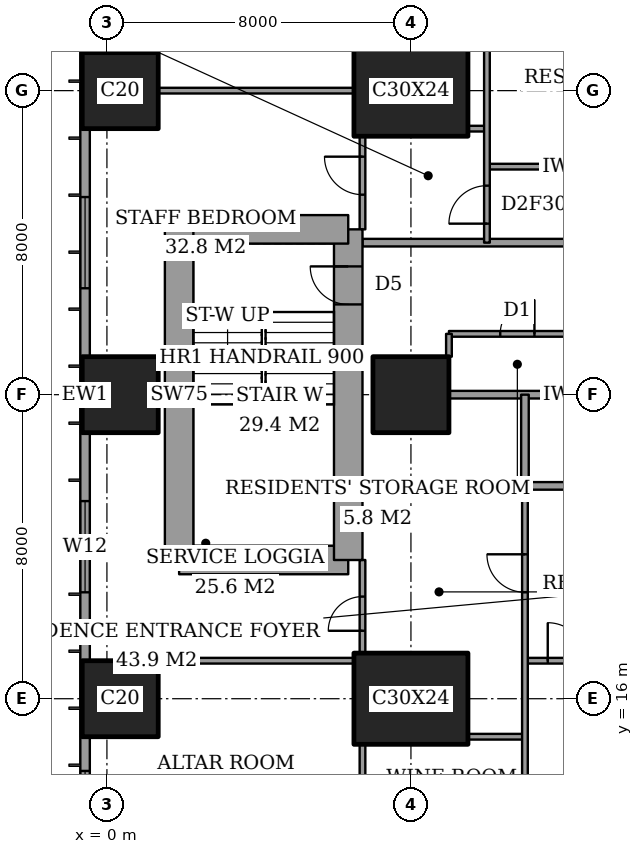
"""IFC4 building model, lengths in metres.
Left out: names, types, materials, properties, quantities, classifications, styles, units other than length and angle.
Written with IfcOpenShell. Run it as: python <this file> out.ifc"""

import sys

from ifc_helpers import new_model, si_unit, direction, frame, frame_2d, origin, origin_2d, place, context, subcontext, project, spatial, rectangle, extrude, element, fill, save


model = new_model("IFC4")
c1 = context("Model", 3, precision=1e-05, world=origin(), true_north=direction((0.0, 1.0)))
c2 = subcontext(c1, "Body", "Model", "MODEL_VIEW")
j1 = project(units=[si_unit("LENGTHUNIT", "METRE"), si_unit("PLANEANGLEUNIT", "RADIAN")], contexts=[c1])
p1 = place(None, origin())
s1 = spatial("IfcSite", under=j1, at=p1, CompositionType="ELEMENT")
p2 = place(p1, origin())
s2 = spatial("IfcBuilding", under=s1, at=p2, CompositionType="ELEMENT")
p3 = place(p2, frame((0.0, 0.0, 96.2)))
s3 = spatial("IfcBuildingStorey", under=s2, at=p3, CompositionType="ELEMENT", Elevation=96.2)
for number, where, z_axis, x_axis in (
    (1, (0.35, 16.0, 0.0), (0.0, 0.0, 1.0), (1.0, 0.0, 0.0)),
    (2, (0.35, 24.0, 0.0), (0.0, 0.0, 1.0), (1.0, 0.0, 0.0)),
    (3, (0.35, 32.0, 0.0), (0.0, 0.0, 1.0), (1.0, 0.0, 0.0)),
):
    element("IfcColumn", number, at=place(p3, frame(where, z_axis=z_axis, x_axis=x_axis)), inside=s3, PredefinedType="COLUMN", context=c2, shape_type="SweptSolid", body=[
        extrude(rectangle(XDim=2.0, YDim=2.0, at=origin_2d()), origin(), (0.0, 0.0, 1.0), 3.6),
    ])
p4 = place(p3, frame((8.0, 16.0, 0.0), z_axis=(0.0, 0.0, 1.0), x_axis=(1.0, 0.0, 0.0)))
e4 = element("IfcColumn", 4, at=p4, inside=s3, PredefinedType="COLUMN", context=c2, shape_type="SweptSolid", body=[
    extrude(rectangle(XDim=3.0, YDim=2.4, at=origin_2d()), origin(), (0.0, 0.0, 1.0), 3.6),
])
p5 = place(p3, frame((8.0, 24.0, 0.0), z_axis=(0.0, 0.0, 1.0), x_axis=(1.0, 0.0, 0.0)))
e5 = element("IfcColumn", 5, at=p5, inside=s3, PredefinedType="COLUMN", context=c2, shape_type="SweptSolid", body=[
    extrude(rectangle(XDim=2.0, YDim=2.0, at=origin_2d()), origin(), (0.0, 0.0, 1.0), 3.6),
])
p6 = place(p3, frame((8.0, 32.0, 0.0), z_axis=(0.0, 0.0, 1.0), x_axis=(1.0, 0.0, 0.0)))
e6 = element("IfcColumn", 6, at=p6, inside=s3, PredefinedType="COLUMN", context=c2, shape_type="SweptSolid", body=[
    extrude(rectangle(XDim=3.0, YDim=2.4, at=origin_2d()), origin(), (0.0, 0.0, 1.0), 3.6),
])
p7 = place(p3, frame((1.9, 19.65, 0.0), z_axis=(0.0, 0.0, 1.0), x_axis=(1.0, 0.0, 0.0)))
e7 = element("IfcWall", 7, at=p7, inside=s3, PredefinedType="SHEAR", context=c2, shape_type="SweptSolid", body=[
    extrude(rectangle(XDim=4.45, YDim=0.75, at=frame_2d((2.225, 0.0))), origin(), (0.0, 0.0, 1.0), 3.6),
])
p8 = place(p3, frame((6.35, 19.65, 0.0), z_axis=(0.0, 0.0, 1.0), x_axis=(0.0, 1.0, 0.0)))
e8 = element("IfcWall", 8, at=p8, inside=s3, PredefinedType="SHEAR", context=c2, shape_type="SweptSolid", body=[
    extrude(rectangle(XDim=8.7, YDim=0.75, at=frame_2d((4.35, 0.0))), origin(), (0.0, 0.0, 1.0), 3.6),
])
p9 = place(p8, frame((6.725, 0.0, 0.0)))
e9 = element("IfcOpeningElement", 9, at=p9, cuts=e8, PredefinedType="OPENING", context=c2, shape_type="SweptSolid", body=[
    extrude(rectangle(XDim=1.0, YDim=2.1, at=frame_2d((0.5, 1.05))), frame((0.0, 0.385, 0.0), z_axis=(0.0, -1.0, 0.0), x_axis=(1.0, 0.0, 0.0)), (0.0, 0.0, 1.0), 0.77),
])
p10 = place(p3, frame((6.35, 28.35, 0.0), z_axis=(0.0, 0.0, 1.0), x_axis=(-1.0, 0.0, 0.0)))
e10 = element("IfcWall", 10, at=p10, inside=s3, PredefinedType="SHEAR", context=c2, shape_type="SweptSolid", body=[
    extrude(rectangle(XDim=4.45, YDim=0.75, at=frame_2d((2.225, 0.0))), origin(), (0.0, 0.0, 1.0), 3.6),
])
p11 = place(p3, frame((1.9, 28.35, 0.0), z_axis=(0.0, 0.0, 1.0), x_axis=(0.0, -1.0, 0.0)))
e11 = element("IfcWall", 11, at=p11, inside=s3, PredefinedType="SHEAR", context=c2, shape_type="SweptSolid", body=[
    extrude(rectangle(XDim=8.7, YDim=0.75, at=frame_2d((4.35, 0.0))), origin(), (0.0, 0.0, 1.0), 3.6),
])
p12 = place(p3, frame((-0.575, 44.825, 0.0), z_axis=(0.0, 0.0, 1.0), x_axis=(0.0, -1.0, 0.0)))
e12 = element("IfcWall", 12, at=p12, inside=s3, PredefinedType="SOLIDWALL", context=c2, shape_type="SweptSolid", body=[
    extrude(rectangle(XDim=41.65, YDim=0.25, at=frame_2d((20.825, 0.0))), origin(), (0.0, 0.0, 1.0), 3.6),
])
p13 = place(p12, frame((0.775, 0.0, 0.4)))
e13 = element("IfcOpeningElement", 13, at=p13, cuts=e12, PredefinedType="OPENING", context=c2, shape_type="SweptSolid", body=[
    extrude(rectangle(XDim=2.4, YDim=2.2, at=frame_2d((1.2, 1.1))), frame((0.0, 0.135, 0.0), z_axis=(0.0, -1.0, 0.0), x_axis=(1.0, 0.0, 0.0)), (0.0, 0.0, 1.0), 0.27),
])
p14 = place(p12, frame((6.1, 0.0, 0.4)))
e14 = element("IfcOpeningElement", 14, at=p14, cuts=e12, PredefinedType="OPENING", context=c2, shape_type="SweptSolid", body=[
    extrude(rectangle(XDim=1.2, YDim=2.2, at=frame_2d((0.6, 1.1))), frame((0.0, 0.135, 0.0), z_axis=(0.0, -1.0, 0.0), x_axis=(1.0, 0.0, 0.0)), (0.0, 0.0, 1.0), 0.27),
])
p15 = place(p12, frame((8.425, 0.0, 0.4)))
e15 = element("IfcOpeningElement", 15, at=p15, cuts=e12, PredefinedType="OPENING", context=c2, shape_type="SweptSolid", body=[
    extrude(rectangle(XDim=2.4, YDim=2.2, at=frame_2d((1.2, 1.1))), frame((0.0, 0.135, 0.0), z_axis=(0.0, -1.0, 0.0), x_axis=(1.0, 0.0, 0.0)), (0.0, 0.0, 1.0), 0.27),
])
p16 = place(p12, frame((15.625, 0.0, 0.4)))
e16 = element("IfcOpeningElement", 16, at=p16, cuts=e12, PredefinedType="OPENING", context=c2, shape_type="SweptSolid", body=[
    extrude(rectangle(XDim=2.4, YDim=2.2, at=frame_2d((1.2, 1.1))), frame((0.0, 0.135, 0.0), z_axis=(0.0, -1.0, 0.0), x_axis=(1.0, 0.0, 0.0)), (0.0, 0.0, 1.0), 0.27),
])
p17 = place(p12, frame((23.625, 0.0, 0.4)))
e17 = element("IfcOpeningElement", 17, at=p17, cuts=e12, PredefinedType="OPENING", context=c2, shape_type="SweptSolid", body=[
    extrude(rectangle(XDim=2.4, YDim=2.2, at=frame_2d((1.2, 1.1))), frame((0.0, 0.135, 0.0), z_axis=(0.0, -1.0, 0.0), x_axis=(1.0, 0.0, 0.0)), (0.0, 0.0, 1.0), 0.27),
])
p18 = place(p12, frame((30.725, 0.0, 0.4)))
e18 = element("IfcOpeningElement", 18, at=p18, cuts=e12, PredefinedType="OPENING", context=c2, shape_type="SweptSolid", body=[
    extrude(rectangle(XDim=2.4, YDim=2.2, at=frame_2d((1.2, 1.1))), frame((0.0, 0.135, 0.0), z_axis=(0.0, -1.0, 0.0), x_axis=(1.0, 0.0, 0.0)), (0.0, 0.0, 1.0), 0.27),
])
p19 = place(p12, frame((34.325, 0.0, 0.4)))
e19 = element("IfcOpeningElement", 19, at=p19, cuts=e12, PredefinedType="OPENING", context=c2, shape_type="SweptSolid", body=[
    extrude(rectangle(XDim=1.2, YDim=2.2, at=frame_2d((0.6, 1.1))), frame((0.0, 0.135, 0.0), z_axis=(0.0, -1.0, 0.0), x_axis=(1.0, 0.0, 0.0)), (0.0, 0.0, 1.0), 0.27),
])
p20 = place(p12, frame((38.475, 0.0, 0.4)))
e20 = element("IfcOpeningElement", 20, at=p20, cuts=e12, PredefinedType="OPENING", context=c2, shape_type="SweptSolid", body=[
    extrude(rectangle(XDim=2.4, YDim=2.2, at=frame_2d((1.2, 1.1))), frame((0.0, 0.135, 0.0), z_axis=(0.0, -1.0, 0.0), x_axis=(1.0, 0.0, 0.0)), (0.0, 0.0, 1.0), 0.27),
])
p21 = place(p3, frame((9.5, 15.0, 0.0), z_axis=(0.0, 0.0, 1.0), x_axis=(1.0, 0.0, 0.0)))
e21 = element("IfcWall", 21, at=p21, inside=s3, PredefinedType="PARTITIONING", context=c2, shape_type="SweptSolid", body=[
    extrude(rectangle(XDim=1.5, YDim=0.15, at=frame_2d((0.75, 0.0))), origin(), (0.0, 0.0, 1.0), 3.35),
])
p22 = place(p3, frame((1.35, 17.0, 0.0), z_axis=(0.0, 0.0, 1.0), x_axis=(1.0, 0.0, 0.0)))
e22 = element("IfcWall", 22, at=p22, inside=s3, PredefinedType="PARTITIONING", context=c2, shape_type="SweptSolid", body=[
    extrude(rectangle(XDim=5.15, YDim=0.15, at=frame_2d((2.575, 0.0))), origin(), (0.0, 0.0, 1.0), 3.35),
])
p23 = place(p3, frame((11.0, 17.0, 0.0), z_axis=(0.0, 0.0, 1.0), x_axis=(1.0, 0.0, 0.0)))
e23 = element("IfcWall", 23, at=p23, inside=s3, PredefinedType="PARTITIONING", context=c2, shape_type="SweptSolid", body=[
    extrude(rectangle(XDim=3.4, YDim=0.15, at=frame_2d((1.7, 0.0))), origin(), (0.0, 0.0, 1.0), 3.35),
])
p24 = place(p23, frame((0.6, 0.0, 0.0)))
e24 = element("IfcOpeningElement", 24, at=p24, cuts=e23, PredefinedType="OPENING", context=c2, shape_type="SweptSolid", body=[
    extrude(rectangle(XDim=1.0, YDim=2.1, at=frame_2d((0.5, 1.05))), frame((0.0, 0.085, 0.0), z_axis=(0.0, -1.0, 0.0), x_axis=(1.0, 0.0, 0.0)), (0.0, 0.0, 1.0), 0.17),
])
p25 = place(p3, frame((11.0, 21.6, 0.0), z_axis=(0.0, 0.0, 1.0), x_axis=(1.0, 0.0, 0.0)))
e25 = element("IfcWall", 25, at=p25, inside=s3, PredefinedType="PARTITIONING", context=c2, shape_type="SweptSolid", body=[
    extrude(rectangle(XDim=3.8, YDim=0.2, at=frame_2d((1.9, 0.0))), origin(), (0.0, 0.0, 1.0), 3.35),
])
p26 = place(p25, frame((1.45, 0.0, 0.0)))
e26 = element("IfcOpeningElement", 26, at=p26, cuts=e25, PredefinedType="OPENING", context=c2, shape_type="SweptSolid", body=[
    extrude(rectangle(XDim=0.9, YDim=2.1, at=frame_2d((0.45, 1.05))), frame((0.0, 0.11, 0.0), z_axis=(0.0, -1.0, 0.0), x_axis=(1.0, 0.0, 0.0)), (0.0, 0.0, 1.0), 0.22),
])
p27 = place(p3, frame((9.0, 24.0, 0.0), z_axis=(0.0, 0.0, 1.0), x_axis=(1.0, 0.0, 0.0)))
e27 = element("IfcWall", 27, at=p27, inside=s3, PredefinedType="PARTITIONING", context=c2, shape_type="SweptSolid", body=[
    extrude(rectangle(XDim=6.0, YDim=0.2, at=frame_2d((3.0, 0.0))), origin(), (0.0, 0.0, 1.0), 3.35),
])
p28 = place(p3, frame((9.0, 25.6, 0.0), z_axis=(0.0, 0.0, 1.0), x_axis=(1.0, 0.0, 0.0)))
e28 = element("IfcWall", 28, at=p28, inside=s3, PredefinedType="PARTITIONING", context=c2, shape_type="SweptSolid", body=[
    extrude(rectangle(XDim=3.6, YDim=0.15, at=frame_2d((1.8, 0.0))), origin(), (0.0, 0.0, 1.0), 3.35),
])
p29 = place(p28, frame((1.35, 0.0, 0.0)))
e29 = element("IfcOpeningElement", 29, at=p29, cuts=e28, PredefinedType="OPENING", context=c2, shape_type="SweptSolid", body=[
    extrude(rectangle(XDim=0.9, YDim=2.1, at=frame_2d((0.45, 1.05))), frame((0.0, 0.085, 0.0), z_axis=(0.0, -1.0, 0.0), x_axis=(1.0, 0.0, 0.0)), (0.0, 0.0, 1.0), 0.17),
])
p30 = place(p3, frame((6.725, 28.0, 0.0), z_axis=(0.0, 0.0, 1.0), x_axis=(1.0, 0.0, 0.0)))
e30 = element("IfcWall", 30, at=p30, inside=s3, PredefinedType="PARTITIONING", context=c2, shape_type="SweptSolid", body=[
    extrude(rectangle(XDim=17.275, YDim=0.2, at=frame_2d((8.637, 0.0))), origin(), (0.0, 0.0, 1.0), 3.35),
])
p31 = place(p30, frame((6.675, 0.0, 0.0)))
e31 = element("IfcOpeningElement", 31, at=p31, cuts=e30, PredefinedType="OPENING", context=c2, shape_type="SweptSolid", body=[
    extrude(rectangle(XDim=1.2, YDim=2.4, at=frame_2d((0.6, 1.2))), frame((0.0, 0.11, 0.0), z_axis=(0.0, -1.0, 0.0), x_axis=(1.0, 0.0, 0.0)), (0.0, 0.0, 1.0), 0.22),
])
p32 = place(p30, frame((13.775, 0.0, 0.0)))
e32 = element("IfcOpeningElement", 32, at=p32, cuts=e30, PredefinedType="OPENING", context=c2, shape_type="SweptSolid", body=[
    extrude(rectangle(XDim=1.0, YDim=2.1, at=frame_2d((0.5, 1.05))), frame((0.0, 0.11, 0.0), z_axis=(0.0, -1.0, 0.0), x_axis=(1.0, 0.0, 0.0)), (0.0, 0.0, 1.0), 0.22),
])
p33 = place(p3, frame((10.0, 30.0, 0.0), z_axis=(0.0, 0.0, 1.0), x_axis=(1.0, 0.0, 0.0)))
e33 = element("IfcWall", 33, at=p33, inside=s3, PredefinedType="PARTITIONING", context=c2, shape_type="SweptSolid", body=[
    extrude(rectangle(XDim=4.4, YDim=0.15, at=frame_2d((2.2, 0.0))), origin(), (0.0, 0.0, 1.0), 3.35),
])
p34 = place(p33, frame((2.8, 0.0, 0.0)))
e34 = element("IfcOpeningElement", 34, at=p34, cuts=e33, PredefinedType="OPENING", context=c2, shape_type="SweptSolid", body=[
    extrude(rectangle(XDim=1.0, YDim=2.1, at=frame_2d((0.5, 1.05))), frame((0.0, 0.085, 0.0), z_axis=(0.0, -1.0, 0.0), x_axis=(1.0, 0.0, 0.0)), (0.0, 0.0, 1.0), 0.17),
])
p35 = place(p3, frame((9.5, 31.0, 0.0), z_axis=(0.0, 0.0, 1.0), x_axis=(1.0, 0.0, 0.0)))
e35 = element("IfcWall", 35, at=p35, inside=s3, PredefinedType="PARTITIONING", context=c2, shape_type="SweptSolid", body=[
    extrude(rectangle(XDim=0.5, YDim=0.15, at=frame_2d((0.25, 0.0))), origin(), (0.0, 0.0, 1.0), 3.35),
])
p36 = place(p3, frame((1.35, 32.0, 0.0), z_axis=(0.0, 0.0, 1.0), x_axis=(1.0, 0.0, 0.0)))
e36 = element("IfcWall", 36, at=p36, inside=s3, PredefinedType="PARTITIONING", context=c2, shape_type="SweptSolid", body=[
    extrude(rectangle(XDim=5.15, YDim=0.15, at=frame_2d((2.575, 0.0))), origin(), (0.0, 0.0, 1.0), 2.634),
])
p37 = place(p3, frame((6.725, 10.8, 0.0), z_axis=(0.0, 0.0, 1.0), x_axis=(0.0, 1.0, 0.0)))
e37 = element("IfcWall", 37, at=p37, inside=s3, PredefinedType="PARTITIONING", context=c2, shape_type="SweptSolid", body=[
    extrude(rectangle(XDim=4.0, YDim=0.15, at=frame_2d((2.0, 0.0))), origin(), (0.0, 0.0, 1.0), 3.35),
])
p38 = place(p3, frame((6.725, 17.2, 0.0), z_axis=(0.0, 0.0, 1.0), x_axis=(0.0, 1.0, 0.0)))
e38 = element("IfcWall", 38, at=p38, inside=s3, PredefinedType="PARTITIONING", context=c2, shape_type="SweptSolid", body=[
    extrude(rectangle(XDim=2.45, YDim=0.15, at=frame_2d((1.225, 0.0))), origin(), (0.0, 0.0, 1.0), 3.35),
])
p39 = place(p38, frame((0.587, 0.0, 0.0)))
e39 = element("IfcOpeningElement", 39, at=p39, cuts=e38, PredefinedType="OPENING", context=c2, shape_type="SweptSolid", body=[
    extrude(rectangle(XDim=0.9, YDim=2.1, at=frame_2d((0.45, 1.05))), frame((0.0, 0.085, 0.0), z_axis=(0.0, -1.0, 0.0), x_axis=(1.0, 0.0, 0.0)), (0.0, 0.0, 1.0), 0.17),
])
p40 = place(p3, frame((6.725, 28.35, 0.0), z_axis=(0.0, 0.0, 1.0), x_axis=(0.0, 1.0, 0.0)))
e40 = element("IfcWall", 40, at=p40, inside=s3, PredefinedType="PARTITIONING", context=c2, shape_type="SweptSolid", body=[
    extrude(rectangle(XDim=2.45, YDim=0.15, at=frame_2d((1.225, 0.0))), origin(), (0.0, 0.0, 1.0), 3.35),
])
p41 = place(p40, frame((0.913, 0.0, 0.0)))
e41 = element("IfcOpeningElement", 41, at=p41, cuts=e40, PredefinedType="OPENING", context=c2, shape_type="SweptSolid", body=[
    extrude(rectangle(XDim=1.0, YDim=2.1, at=frame_2d((0.5, 1.05))), frame((0.0, 0.085, 0.0), z_axis=(0.0, -1.0, 0.0), x_axis=(1.0, 0.0, 0.0)), (0.0, 0.0, 1.0), 0.17),
])
p42 = place(p3, frame((9.0, 25.0, 0.0), z_axis=(0.0, 0.0, 1.0), x_axis=(0.0, 1.0, 0.0)))
e42 = element("IfcWall", 42, at=p42, inside=s3, PredefinedType="PARTITIONING", context=c2, shape_type="SweptSolid", body=[
    extrude(rectangle(XDim=0.6, YDim=0.15, at=frame_2d((0.3, 0.0))), origin(), (0.0, 0.0, 1.0), 3.35),
])
p43 = place(p3, frame((10.0, 28.0, 0.0), z_axis=(0.0, 0.0, 1.0), x_axis=(0.0, 1.0, 0.0)))
e43 = element("IfcWall", 43, at=p43, inside=s3, PredefinedType="PARTITIONING", context=c2, shape_type="SweptSolid", body=[
    extrude(rectangle(XDim=9.4, YDim=0.15, at=frame_2d((4.7, 0.0))), origin(), (0.0, 0.0, 1.0), 3.35),
])
p44 = place(p43, frame((0.5, 0.0, 0.0)))
e44 = element("IfcOpeningElement", 44, at=p44, cuts=e43, PredefinedType="OPENING", context=c2, shape_type="SweptSolid", body=[
    extrude(rectangle(XDim=1.0, YDim=2.1, at=frame_2d((0.5, 1.05))), frame((0.0, 0.085, 0.0), z_axis=(0.0, -1.0, 0.0), x_axis=(1.0, 0.0, 0.0)), (0.0, 0.0, 1.0), 0.17),
])
p45 = place(p3, frame((11.0, 21.6, 0.0), z_axis=(0.0, 0.0, 1.0), x_axis=(0.0, 1.0, 0.0)))
e45 = element("IfcWall", 45, at=p45, inside=s3, PredefinedType="PARTITIONING", context=c2, shape_type="SweptSolid", body=[
    extrude(rectangle(XDim=2.4, YDim=0.2, at=frame_2d((1.2, 0.0))), origin(), (0.0, 0.0, 1.0), 3.35),
])
p46 = place(p3, frame((11.0, 10.8, 0.0), z_axis=(0.0, 0.0, 1.0), x_axis=(0.0, 1.0, 0.0)))
e46 = element("IfcWall", 46, at=p46, inside=s3, PredefinedType="PARTITIONING", context=c2, shape_type="SweptSolid", body=[
    extrude(rectangle(XDim=10.8, YDim=0.15, at=frame_2d((5.4, 0.0))), origin(), (0.0, 0.0, 1.0), 3.35),
])
p47 = place(p46, frame((8.0, 0.0, 0.0)))
e47 = element("IfcOpeningElement", 47, at=p47, cuts=e46, PredefinedType="OPENING", context=c2, shape_type="SweptSolid", body=[
    extrude(rectangle(XDim=1.0, YDim=2.1, at=frame_2d((0.5, 1.05))), frame((0.0, 0.085, 0.0), z_axis=(0.0, -1.0, 0.0), x_axis=(1.0, 0.0, 0.0)), (0.0, 0.0, 1.0), 0.17),
])
p48 = place(p16, origin())
e48 = element("IfcWindow", 48, at=p48, inside=s3, PartitioningType="SINGLE_PANEL", PredefinedType="WINDOW", context=c2, shape_type="SweptSolid", body=[
    extrude(rectangle(XDim=2.4, YDim=2.2, at=frame_2d((1.2, 1.1))), frame((0.0, 0.03, 0.0), z_axis=(0.0, -1.0, 0.0), x_axis=(1.0, 0.0, 0.0)), (0.0, 0.0, 1.0), 0.06),
])
fill(e16, e48)
p49 = place(p17, origin())
e49 = element("IfcWindow", 49, at=p49, inside=s3, PartitioningType="SINGLE_PANEL", PredefinedType="WINDOW", context=c2, shape_type="SweptSolid", body=[
    extrude(rectangle(XDim=2.4, YDim=2.2, at=frame_2d((1.2, 1.1))), frame((0.0, 0.03, 0.0), z_axis=(0.0, -1.0, 0.0), x_axis=(1.0, 0.0, 0.0)), (0.0, 0.0, 1.0), 0.06),
])
fill(e17, e49)
p50 = place(p18, origin())
e50 = element("IfcWindow", 50, at=p50, inside=s3, PartitioningType="SINGLE_PANEL", PredefinedType="WINDOW", context=c2, shape_type="SweptSolid", body=[
    extrude(rectangle(XDim=2.4, YDim=2.2, at=frame_2d((1.2, 1.1))), frame((0.0, 0.03, 0.0), z_axis=(0.0, -1.0, 0.0), x_axis=(1.0, 0.0, 0.0)), (0.0, 0.0, 1.0), 0.06),
])
fill(e18, e50)
p51 = place(p39, origin())
e51 = element("IfcDoor", 51, at=p51, inside=s3, OperationType="SINGLE_SWING_RIGHT", PredefinedType="DOOR", context=c2, shape_type="SweptSolid", body=[
    extrude(rectangle(XDim=0.9, YDim=2.1, at=frame_2d((0.45, 1.05))), frame((0.0, 0.025, 0.0), z_axis=(0.0, -1.0, 0.0), x_axis=(1.0, 0.0, 0.0)), (0.0, 0.0, 1.0), 0.05),
])
fill(e39, e51)
p52 = place(p47, origin())
e52 = element("IfcDoor", 52, at=p52, inside=s3, OperationType="SINGLE_SWING_LEFT", PredefinedType="DOOR", context=c2, shape_type="SweptSolid", body=[
    extrude(rectangle(XDim=1.0, YDim=2.1, at=frame_2d((0.5, 1.05))), frame((0.0, 0.025, 0.0), z_axis=(0.0, -1.0, 0.0), x_axis=(1.0, 0.0, 0.0)), (0.0, 0.0, 1.0), 0.05),
])
fill(e47, e52)
p53 = place(p24, origin())
e53 = element("IfcDoor", 53, at=p53, inside=s3, OperationType="SINGLE_SWING_RIGHT", PredefinedType="DOOR", context=c2, shape_type="SweptSolid", body=[
    extrude(rectangle(XDim=1.0, YDim=2.1, at=frame_2d((0.5, 1.05))), frame((0.0, 0.025, 0.0), z_axis=(0.0, -1.0, 0.0), x_axis=(1.0, 0.0, 0.0)), (0.0, 0.0, 1.0), 0.05),
])
fill(e24, e53)
p54 = place(p41, origin())
e54 = element("IfcDoor", 54, at=p54, inside=s3, OperationType="SINGLE_SWING_LEFT", PredefinedType="DOOR", context=c2, shape_type="SweptSolid", body=[
    extrude(rectangle(XDim=1.0, YDim=2.1, at=frame_2d((0.5, 1.05))), frame((0.0, 0.025, 0.0), z_axis=(0.0, -1.0, 0.0), x_axis=(1.0, 0.0, 0.0)), (0.0, 0.0, 1.0), 0.05),
])
fill(e41, e54)
p55 = place(p44, origin())
e55 = element("IfcDoor", 55, at=p55, inside=s3, OperationType="SINGLE_SWING_RIGHT", PredefinedType="DOOR", context=c2, shape_type="SweptSolid", body=[
    extrude(rectangle(XDim=1.0, YDim=2.1, at=frame_2d((0.5, 1.05))), frame((0.0, 0.025, 0.0), z_axis=(0.0, -1.0, 0.0), x_axis=(1.0, 0.0, 0.0)), (0.0, 0.0, 1.0), 0.05),
])
fill(e44, e55)
p56 = place(p29, origin())
e56 = element("IfcDoor", 56, at=p56, inside=s3, OperationType="SINGLE_SWING_LEFT", PredefinedType="DOOR", context=c2, shape_type="SweptSolid", body=[
    extrude(rectangle(XDim=0.9, YDim=2.1, at=frame_2d((0.45, 1.05))), frame((0.0, 0.025, 0.0), z_axis=(0.0, -1.0, 0.0), x_axis=(1.0, 0.0, 0.0)), (0.0, 0.0, 1.0), 0.05),
])
fill(e29, e56)
p57 = place(p9, origin())
e57 = element("IfcDoor", 57, at=p57, inside=s3, OperationType="SINGLE_SWING_LEFT", PredefinedType="DOOR", context=c2, shape_type="SweptSolid", body=[
    extrude(rectangle(XDim=1.0, YDim=2.1, at=frame_2d((0.5, 1.05))), frame((0.0, 0.025, 0.0), z_axis=(0.0, -1.0, 0.0), x_axis=(1.0, 0.0, 0.0)), (0.0, 0.0, 1.0), 0.05),
])
fill(e9, e57)
save(model, sys.argv[1])
